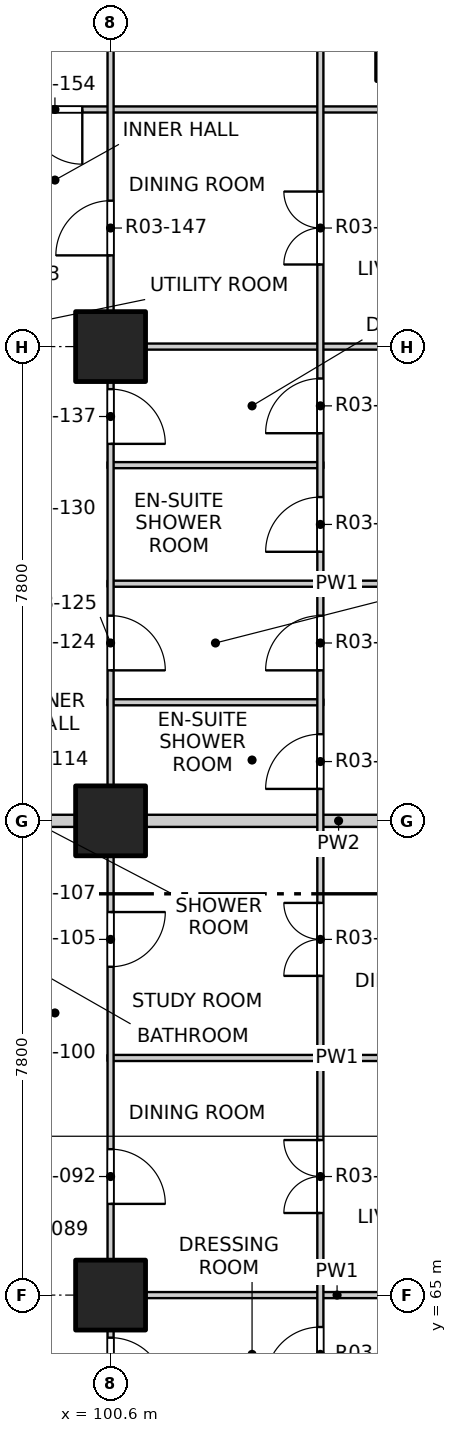
"""IFC4 building model, lengths in metres.
Left out: names, types, materials, properties, quantities, classifications, styles, units other than length and angle.
Written with IfcOpenShell. Run it as: python <this file> out.ifc"""

import sys

from ifc_helpers import new_model, si_unit, direction, frame, frame_2d, origin, origin_2d, place, context, subcontext, project, spatial, rectangle, extrude, element, fill, save


model = new_model("IFC4")
c1 = context("Model", 3, precision=1e-05, world=origin(), true_north=direction((0.0, 1.0)))
c2 = subcontext(c1, "Body", "Model", "MODEL_VIEW")
j1 = project(units=[si_unit("LENGTHUNIT", "METRE"), si_unit("PLANEANGLEUNIT", "RADIAN")], contexts=[c1])
p1 = place(None, origin())
s1 = spatial("IfcSite", under=j1, at=p1, CompositionType="ELEMENT")
p2 = place(p1, origin())
s2 = spatial("IfcBuilding", under=s1, at=p2, CompositionType="ELEMENT")
p3 = place(p2, frame((0.0, 0.0, 39.9)))
s3 = spatial("IfcBuildingStorey", under=s2, at=p3, CompositionType="ELEMENT", Elevation=39.9)
p4 = place(p3, frame((105.5, 85.5, -0.25), z_axis=(0.0, 0.0, 1.0), x_axis=(1.0, 0.0, 0.0)))
e1 = element("IfcColumn", 1, at=p4, inside=s3, PredefinedType="COLUMN", context=c2, shape_type="SweptSolid", body=[
    extrude(rectangle(XDim=1.05, YDim=1.05, at=origin_2d()), origin(), (0.0, 0.0, 1.0), 3.4),
])
for number, where, z_axis, x_axis in (
    (2, (100.6, 65.0, -0.25), (0.0, 0.0, 1.0), (1.0, 0.0, 0.0)),
    (3, (100.6, 72.8, -0.25), (0.0, 0.0, 1.0), (1.0, 0.0, 0.0)),
    (4, (100.6, 80.6, -0.25), (0.0, 0.0, 1.0), (1.0, 0.0, 0.0)),
):
    element("IfcColumn", number, at=place(p3, frame(where, z_axis=z_axis, x_axis=x_axis)), inside=s3, PredefinedType="COLUMN", context=c2, shape_type="SweptSolid", body=[
        extrude(rectangle(XDim=1.15, YDim=1.15, at=origin_2d()), origin(), (0.0, 0.0, 1.0), 3.4),
    ])
p5 = place(p3, frame((100.55, 65.0, 0.0), z_axis=(0.0, 0.0, 1.0), x_axis=(1.0, 0.0, 0.0)))
e5 = element("IfcWall", 5, at=p5, inside=s3, PredefinedType="PARTITIONING", context=c2, shape_type="SweptSolid", body=[
    extrude(rectangle(XDim=7.55, YDim=0.1, at=frame_2d((3.775, 0.0))), origin(), (0.0, 0.0, 1.0), 2.55),
])
p6 = place(p3, frame((100.55, 68.9, 0.0), z_axis=(0.0, 0.0, 1.0), x_axis=(1.0, 0.0, 0.0)))
e6 = element("IfcWall", 6, at=p6, inside=s3, PredefinedType="PARTITIONING", context=c2, shape_type="SweptSolid", body=[
    extrude(rectangle(XDim=7.55, YDim=0.1, at=frame_2d((3.775, 0.0))), origin(), (0.0, 0.0, 1.0), 3.15),
])
p7 = place(p3, frame((96.6, 72.8, 0.0), z_axis=(0.0, 0.0, 1.0), x_axis=(1.0, 0.0, 0.0)))
e7 = element("IfcWall", 7, at=p7, inside=s3, PredefinedType="PARTITIONING", context=c2, shape_type="SweptSolid", body=[
    extrude(rectangle(XDim=4.0, YDim=0.2, at=frame_2d((2.0, 0.0))), origin(), (0.0, 0.0, 1.0), 3.15),
])
p8 = place(p3, frame((100.6, 72.8, 0.0), z_axis=(0.0, 0.0, 1.0), x_axis=(1.0, 0.0, 0.0)))
e8 = element("IfcWall", 8, at=p8, inside=s3, PredefinedType="PARTITIONING", context=c2, shape_type="SweptSolid", body=[
    extrude(rectangle(XDim=7.5, YDim=0.2, at=frame_2d((3.75, 0.0))), origin(), (0.0, 0.0, 1.0), 2.55),
])
p9 = place(p3, frame((100.55, 74.75, 0.0), z_axis=(0.0, 0.0, 1.0), x_axis=(1.0, 0.0, 0.0)))
e9 = element("IfcWall", 9, at=p9, inside=s3, PredefinedType="PARTITIONING", context=c2, shape_type="SweptSolid", body=[
    extrude(rectangle(XDim=3.55, YDim=0.1, at=frame_2d((1.775, 0.0))), origin(), (0.0, 0.0, 1.0), 3.15),
])
p10 = place(p3, frame((100.55, 76.7, 0.0), z_axis=(0.0, 0.0, 1.0), x_axis=(1.0, 0.0, 0.0)))
e10 = element("IfcWall", 10, at=p10, inside=s3, PredefinedType="PARTITIONING", context=c2, shape_type="SweptSolid", body=[
    extrude(rectangle(XDim=7.55, YDim=0.1, at=frame_2d((3.775, 0.0))), origin(), (0.0, 0.0, 1.0), 3.15),
])
p11 = place(p3, frame((100.55, 78.65, 0.0), z_axis=(0.0, 0.0, 1.0), x_axis=(1.0, 0.0, 0.0)))
e11 = element("IfcWall", 11, at=p11, inside=s3, PredefinedType="PARTITIONING", context=c2, shape_type="SweptSolid", body=[
    extrude(rectangle(XDim=3.55, YDim=0.1, at=frame_2d((1.775, 0.0))), origin(), (0.0, 0.0, 1.0), 3.15),
])
p12 = place(p3, frame((100.55, 80.6, 0.0), z_axis=(0.0, 0.0, 1.0), x_axis=(1.0, 0.0, 0.0)))
e12 = element("IfcWall", 12, at=p12, inside=s3, PredefinedType="PARTITIONING", context=c2, shape_type="SweptSolid", body=[
    extrude(rectangle(XDim=7.55, YDim=0.1, at=frame_2d((3.775, 0.0))), origin(), (0.0, 0.0, 1.0), 2.55),
])
p13 = place(p3, frame((96.6, 84.5, 0.0), z_axis=(0.0, 0.0, 1.0), x_axis=(1.0, 0.0, 0.0)))
e13 = element("IfcWall", 13, at=p13, inside=s3, PredefinedType="PARTITIONING", context=c2, shape_type="SweptSolid", body=[
    extrude(rectangle(XDim=11.5, YDim=0.1, at=frame_2d((5.75, 0.0))), origin(), (0.0, 0.0, 1.0), 3.15),
])
p14 = place(p13, frame((2.635, 0.0, 0.0)))
e14 = element("IfcOpeningElement", 14, at=p14, cuts=e13, PredefinedType="OPENING", context=c2, shape_type="SweptSolid", body=[
    extrude(rectangle(XDim=0.9, YDim=2.1, at=frame_2d((0.45, 1.05))), frame((0.0, 0.06, 0.0), z_axis=(0.0, -1.0, 0.0), x_axis=(1.0, 0.0, 0.0)), (0.0, 0.0, 1.0), 0.12),
])
p15 = place(p3, frame((100.6, 49.4, 0.0), z_axis=(0.0, 0.0, 1.0), x_axis=(0.0, 1.0, 0.0)))
e15 = element("IfcWall", 15, at=p15, inside=s3, PredefinedType="PARTITIONING", context=c2, shape_type="SweptSolid", body=[
    extrude(rectangle(XDim=31.2, YDim=0.1, at=frame_2d((15.6, 0.0))), origin(), (0.0, 0.0, 1.0), 3.15),
])
p16 = place(p15, frame((1.5, 0.0, 0.0)))
e16 = element("IfcOpeningElement", 16, at=p16, cuts=e15, PredefinedType="OPENING", context=c2, shape_type="SweptSolid", body=[
    extrude(rectangle(XDim=0.9, YDim=2.1, at=frame_2d((0.45, 1.05))), frame((0.0, 0.06, 0.0), z_axis=(0.0, -1.0, 0.0), x_axis=(1.0, 0.0, 0.0)), (0.0, 0.0, 1.0), 0.12),
])
p17 = place(p15, frame((6.225, 0.0, 0.0)))
e17 = element("IfcOpeningElement", 17, at=p17, cuts=e15, PredefinedType="OPENING", context=c2, shape_type="SweptSolid", body=[
    extrude(rectangle(XDim=0.9, YDim=2.1, at=frame_2d((0.45, 1.05))), frame((0.0, 0.06, 0.0), z_axis=(0.0, -1.0, 0.0), x_axis=(1.0, 0.0, 0.0)), (0.0, 0.0, 1.0), 0.12),
])
p18 = place(p15, frame((10.275, 0.0, 0.0)))
e18 = element("IfcOpeningElement", 18, at=p18, cuts=e15, PredefinedType="OPENING", context=c2, shape_type="SweptSolid", body=[
    extrude(rectangle(XDim=0.9, YDim=2.1, at=frame_2d((0.45, 1.05))), frame((0.0, 0.06, 0.0), z_axis=(0.0, -1.0, 0.0), x_axis=(1.0, 0.0, 0.0)), (0.0, 0.0, 1.0), 0.12),
])
p19 = place(p15, frame((14.0, 0.0, 0.0)))
e19 = element("IfcOpeningElement", 19, at=p19, cuts=e15, PredefinedType="OPENING", context=c2, shape_type="SweptSolid", body=[
    extrude(rectangle(XDim=0.9, YDim=2.1, at=frame_2d((0.45, 1.05))), frame((0.0, 0.06, 0.0), z_axis=(0.0, -1.0, 0.0), x_axis=(1.0, 0.0, 0.0)), (0.0, 0.0, 1.0), 0.12),
])
p20 = place(p15, frame((17.1, 0.0, 0.0)))
e20 = element("IfcOpeningElement", 20, at=p20, cuts=e15, PredefinedType="OPENING", context=c2, shape_type="SweptSolid", body=[
    extrude(rectangle(XDim=0.9, YDim=2.1, at=frame_2d((0.45, 1.05))), frame((0.0, 0.06, 0.0), z_axis=(0.0, -1.0, 0.0), x_axis=(1.0, 0.0, 0.0)), (0.0, 0.0, 1.0), 0.12),
])
p21 = place(p15, frame((21.0, 0.0, 0.0)))
e21 = element("IfcOpeningElement", 21, at=p21, cuts=e15, PredefinedType="OPENING", context=c2, shape_type="SweptSolid", body=[
    extrude(rectangle(XDim=0.9, YDim=2.1, at=frame_2d((0.45, 1.05))), frame((0.0, 0.06, 0.0), z_axis=(0.0, -1.0, 0.0), x_axis=(1.0, 0.0, 0.0)), (0.0, 0.0, 1.0), 0.12),
])
p22 = place(p15, frame((25.875, 0.0, 0.0)))
e22 = element("IfcOpeningElement", 22, at=p22, cuts=e15, PredefinedType="OPENING", context=c2, shape_type="SweptSolid", body=[
    extrude(rectangle(XDim=0.9, YDim=2.1, at=frame_2d((0.45, 1.05))), frame((0.0, 0.06, 0.0), z_axis=(0.0, -1.0, 0.0), x_axis=(1.0, 0.0, 0.0)), (0.0, 0.0, 1.0), 0.12),
])
p23 = place(p15, frame((29.6, 0.0, 0.0)))
e23 = element("IfcOpeningElement", 23, at=p23, cuts=e15, PredefinedType="OPENING", context=c2, shape_type="SweptSolid", body=[
    extrude(rectangle(XDim=0.9, YDim=2.1, at=frame_2d((0.45, 1.05))), frame((0.0, 0.06, 0.0), z_axis=(0.0, -1.0, 0.0), x_axis=(1.0, 0.0, 0.0)), (0.0, 0.0, 1.0), 0.12),
])
p24 = place(p3, frame((100.6, 80.6, 0.0), z_axis=(0.0, 0.0, 1.0), x_axis=(0.0, 1.0, 0.0)))
e24 = element("IfcWall", 24, at=p24, inside=s3, PredefinedType="PARTITIONING", context=c2, shape_type="SweptSolid", body=[
    extrude(rectangle(XDim=7.5, YDim=0.1, at=frame_2d((3.75, 0.0))), origin(), (0.0, 0.0, 1.0), 2.55),
])
p25 = place(p24, frame((1.5, 0.0, 0.0)))
e25 = element("IfcOpeningElement", 25, at=p25, cuts=e24, PredefinedType="OPENING", context=c2, shape_type="SweptSolid", body=[
    extrude(rectangle(XDim=0.9, YDim=2.1, at=frame_2d((0.45, 1.05))), frame((0.0, 0.06, 0.0), z_axis=(0.0, -1.0, 0.0), x_axis=(1.0, 0.0, 0.0)), (0.0, 0.0, 1.0), 0.12),
])
p26 = place(p24, frame((5.4, 0.0, 0.0)))
e26 = element("IfcOpeningElement", 26, at=p26, cuts=e24, PredefinedType="OPENING", context=c2, shape_type="SweptSolid", body=[
    extrude(rectangle(XDim=0.9, YDim=2.1, at=frame_2d((0.45, 1.05))), frame((0.0, 0.06, 0.0), z_axis=(0.0, -1.0, 0.0), x_axis=(1.0, 0.0, 0.0)), (0.0, 0.0, 1.0), 0.12),
])
p27 = place(p3, frame((104.05, 41.9, 0.0), z_axis=(0.0, 0.0, 1.0), x_axis=(0.0, 1.0, 0.0)))
e27 = element("IfcWall", 27, at=p27, inside=s3, PredefinedType="PARTITIONING", context=c2, shape_type="SweptSolid", body=[
    extrude(rectangle(XDim=46.2, YDim=0.1, at=frame_2d((23.1, 0.0))), origin(), (0.0, 0.0, 1.0), 3.15),
])
p28 = place(p27, frame((1.05, 0.0, 0.0)))
e28 = element("IfcOpeningElement", 28, at=p28, cuts=e27, PredefinedType="OPENING", context=c2, shape_type="SweptSolid", body=[
    extrude(rectangle(XDim=1.2, YDim=2.1, at=frame_2d((0.6, 1.05))), frame((0.0, 0.06, 0.0), z_axis=(0.0, -1.0, 0.0), x_axis=(1.0, 0.0, 0.0)), (0.0, 0.0, 1.0), 0.12),
])
p29 = place(p27, frame((4.125, 0.0, 0.0)))
e29 = element("IfcOpeningElement", 29, at=p29, cuts=e27, PredefinedType="OPENING", context=c2, shape_type="SweptSolid", body=[
    extrude(rectangle(XDim=0.9, YDim=2.1, at=frame_2d((0.45, 1.05))), frame((0.0, 0.06, 0.0), z_axis=(0.0, -1.0, 0.0), x_axis=(1.0, 0.0, 0.0)), (0.0, 0.0, 1.0), 0.12),
])
p30 = place(p27, frame((6.075, 0.0, 0.0)))
e30 = element("IfcOpeningElement", 30, at=p30, cuts=e27, PredefinedType="OPENING", context=c2, shape_type="SweptSolid", body=[
    extrude(rectangle(XDim=0.9, YDim=2.1, at=frame_2d((0.45, 1.05))), frame((0.0, 0.06, 0.0), z_axis=(0.0, -1.0, 0.0), x_axis=(1.0, 0.0, 0.0)), (0.0, 0.0, 1.0), 0.12),
])
p31 = place(p27, frame((8.85, 0.0, 0.0)))
e31 = element("IfcOpeningElement", 31, at=p31, cuts=e27, PredefinedType="OPENING", context=c2, shape_type="SweptSolid", body=[
    extrude(rectangle(XDim=1.2, YDim=2.1, at=frame_2d((0.6, 1.05))), frame((0.0, 0.06, 0.0), z_axis=(0.0, -1.0, 0.0), x_axis=(1.0, 0.0, 0.0)), (0.0, 0.0, 1.0), 0.12),
])
p32 = place(p27, frame((11.925, 0.0, 0.0)))
e32 = element("IfcOpeningElement", 32, at=p32, cuts=e27, PredefinedType="OPENING", context=c2, shape_type="SweptSolid", body=[
    extrude(rectangle(XDim=0.9, YDim=2.1, at=frame_2d((0.45, 1.05))), frame((0.0, 0.06, 0.0), z_axis=(0.0, -1.0, 0.0), x_axis=(1.0, 0.0, 0.0)), (0.0, 0.0, 1.0), 0.12),
])
p33 = place(p27, frame((13.875, 0.0, 0.0)))
e33 = element("IfcOpeningElement", 33, at=p33, cuts=e27, PredefinedType="OPENING", context=c2, shape_type="SweptSolid", body=[
    extrude(rectangle(XDim=0.9, YDim=2.1, at=frame_2d((0.45, 1.05))), frame((0.0, 0.06, 0.0), z_axis=(0.0, -1.0, 0.0), x_axis=(1.0, 0.0, 0.0)), (0.0, 0.0, 1.0), 0.12),
])
p34 = place(p27, frame((15.825, 0.0, 0.0)))
e34 = element("IfcOpeningElement", 34, at=p34, cuts=e27, PredefinedType="OPENING", context=c2, shape_type="SweptSolid", body=[
    extrude(rectangle(XDim=0.9, YDim=2.1, at=frame_2d((0.45, 1.05))), frame((0.0, 0.06, 0.0), z_axis=(0.0, -1.0, 0.0), x_axis=(1.0, 0.0, 0.0)), (0.0, 0.0, 1.0), 0.12),
])
p35 = place(p27, frame((17.775, 0.0, 0.0)))
e35 = element("IfcOpeningElement", 35, at=p35, cuts=e27, PredefinedType="OPENING", context=c2, shape_type="SweptSolid", body=[
    extrude(rectangle(XDim=0.9, YDim=2.1, at=frame_2d((0.45, 1.05))), frame((0.0, 0.06, 0.0), z_axis=(0.0, -1.0, 0.0), x_axis=(1.0, 0.0, 0.0)), (0.0, 0.0, 1.0), 0.12),
])
p36 = place(p27, frame((19.725, 0.0, 0.0)))
e36 = element("IfcOpeningElement", 36, at=p36, cuts=e27, PredefinedType="OPENING", context=c2, shape_type="SweptSolid", body=[
    extrude(rectangle(XDim=0.9, YDim=2.1, at=frame_2d((0.45, 1.05))), frame((0.0, 0.06, 0.0), z_axis=(0.0, -1.0, 0.0), x_axis=(1.0, 0.0, 0.0)), (0.0, 0.0, 1.0), 0.12),
])
p37 = place(p27, frame((21.675, 0.0, 0.0)))
e37 = element("IfcOpeningElement", 37, at=p37, cuts=e27, PredefinedType="OPENING", context=c2, shape_type="SweptSolid", body=[
    extrude(rectangle(XDim=0.9, YDim=2.1, at=frame_2d((0.45, 1.05))), frame((0.0, 0.06, 0.0), z_axis=(0.0, -1.0, 0.0), x_axis=(1.0, 0.0, 0.0)), (0.0, 0.0, 1.0), 0.12),
])
p38 = place(p27, frame((24.45, 0.0, 0.0)))
e38 = element("IfcOpeningElement", 38, at=p38, cuts=e27, PredefinedType="OPENING", context=c2, shape_type="SweptSolid", body=[
    extrude(rectangle(XDim=1.2, YDim=2.1, at=frame_2d((0.6, 1.05))), frame((0.0, 0.06, 0.0), z_axis=(0.0, -1.0, 0.0), x_axis=(1.0, 0.0, 0.0)), (0.0, 0.0, 1.0), 0.12),
])
p39 = place(p27, frame((28.35, 0.0, 0.0)))
e39 = element("IfcOpeningElement", 39, at=p39, cuts=e27, PredefinedType="OPENING", context=c2, shape_type="SweptSolid", body=[
    extrude(rectangle(XDim=1.2, YDim=2.1, at=frame_2d((0.6, 1.05))), frame((0.0, 0.06, 0.0), z_axis=(0.0, -1.0, 0.0), x_axis=(1.0, 0.0, 0.0)), (0.0, 0.0, 1.0), 0.12),
])
p40 = place(p27, frame((31.425, 0.0, 0.0)))
e40 = element("IfcOpeningElement", 40, at=p40, cuts=e27, PredefinedType="OPENING", context=c2, shape_type="SweptSolid", body=[
    extrude(rectangle(XDim=0.9, YDim=2.1, at=frame_2d((0.45, 1.05))), frame((0.0, 0.06, 0.0), z_axis=(0.0, -1.0, 0.0), x_axis=(1.0, 0.0, 0.0)), (0.0, 0.0, 1.0), 0.12),
])
p41 = place(p27, frame((33.375, 0.0, 0.0)))
e41 = element("IfcOpeningElement", 41, at=p41, cuts=e27, PredefinedType="OPENING", context=c2, shape_type="SweptSolid", body=[
    extrude(rectangle(XDim=0.9, YDim=2.1, at=frame_2d((0.45, 1.05))), frame((0.0, 0.06, 0.0), z_axis=(0.0, -1.0, 0.0), x_axis=(1.0, 0.0, 0.0)), (0.0, 0.0, 1.0), 0.12),
])
p42 = place(p27, frame((35.325, 0.0, 0.0)))
e42 = element("IfcOpeningElement", 42, at=p42, cuts=e27, PredefinedType="OPENING", context=c2, shape_type="SweptSolid", body=[
    extrude(rectangle(XDim=0.9, YDim=2.1, at=frame_2d((0.45, 1.05))), frame((0.0, 0.06, 0.0), z_axis=(0.0, -1.0, 0.0), x_axis=(1.0, 0.0, 0.0)), (0.0, 0.0, 1.0), 0.12),
])
p43 = place(p27, frame((37.275, 0.0, 0.0)))
e43 = element("IfcOpeningElement", 43, at=p43, cuts=e27, PredefinedType="OPENING", context=c2, shape_type="SweptSolid", body=[
    extrude(rectangle(XDim=0.9, YDim=2.1, at=frame_2d((0.45, 1.05))), frame((0.0, 0.06, 0.0), z_axis=(0.0, -1.0, 0.0), x_axis=(1.0, 0.0, 0.0)), (0.0, 0.0, 1.0), 0.12),
])
p44 = place(p27, frame((40.05, 0.0, 0.0)))
e44 = element("IfcOpeningElement", 44, at=p44, cuts=e27, PredefinedType="OPENING", context=c2, shape_type="SweptSolid", body=[
    extrude(rectangle(XDim=1.2, YDim=2.1, at=frame_2d((0.6, 1.05))), frame((0.0, 0.06, 0.0), z_axis=(0.0, -1.0, 0.0), x_axis=(1.0, 0.0, 0.0)), (0.0, 0.0, 1.0), 0.12),
])
p45 = place(p27, frame((43.95, 0.0, 0.0)))
e45 = element("IfcOpeningElement", 45, at=p45, cuts=e27, PredefinedType="OPENING", context=c2, shape_type="SweptSolid", body=[
    extrude(rectangle(XDim=1.2, YDim=2.1, at=frame_2d((0.6, 1.05))), frame((0.0, 0.06, 0.0), z_axis=(0.0, -1.0, 0.0), x_axis=(1.0, 0.0, 0.0)), (0.0, 0.0, 1.0), 0.12),
])
p46 = place(p19, origin())
e46 = element("IfcDoor", 46, at=p46, inside=s3, OperationType="SINGLE_SWING_RIGHT", PredefinedType="DOOR", context=c2, shape_type="SweptSolid", body=[
    extrude(rectangle(XDim=0.9, YDim=2.1, at=frame_2d((0.45, 1.05))), frame((0.0, 0.025, 0.0), z_axis=(0.0, -1.0, 0.0), x_axis=(1.0, 0.0, 0.0)), (0.0, 0.0, 1.0), 0.05),
])
fill(e19, e46)
p47 = place(p37, origin())
e47 = element("IfcDoor", 47, at=p47, inside=s3, OperationType="SINGLE_SWING_LEFT", PredefinedType="DOOR", context=c2, shape_type="SweptSolid", body=[
    extrude(rectangle(XDim=0.9, YDim=2.1, at=frame_2d((0.45, 1.05))), frame((0.0, 0.025, 0.0), z_axis=(0.0, -1.0, 0.0), x_axis=(1.0, 0.0, 0.0)), (0.0, 0.0, 1.0), 0.05),
])
fill(e37, e47)
p48 = place(p20, origin())
e48 = element("IfcDoor", 48, at=p48, inside=s3, OperationType="SINGLE_SWING_RIGHT", PredefinedType="DOOR", context=c2, shape_type="SweptSolid", body=[
    extrude(rectangle(XDim=0.9, YDim=2.1, at=frame_2d((0.45, 1.05))), frame((0.0, 0.025, 0.0), z_axis=(0.0, -1.0, 0.0), x_axis=(1.0, 0.0, 0.0)), (0.0, 0.0, 1.0), 0.05),
])
fill(e20, e48)
p49 = place(p38, origin())
e49 = element("IfcDoor", 49, at=p49, inside=s3, OperationType="DOUBLE_DOOR_SINGLE_SWING", PredefinedType="DOOR", context=c2, shape_type="SweptSolid", body=[
    extrude(rectangle(XDim=1.2, YDim=2.1, at=frame_2d((0.6, 1.05))), frame((0.0, 0.025, 0.0), z_axis=(0.0, -1.0, 0.0), x_axis=(1.0, 0.0, 0.0)), (0.0, 0.0, 1.0), 0.05),
])
fill(e38, e49)
p50 = place(p21, origin())
e50 = element("IfcDoor", 50, at=p50, inside=s3, OperationType="SINGLE_SWING_LEFT", PredefinedType="DOOR", context=c2, shape_type="SweptSolid", body=[
    extrude(rectangle(XDim=0.9, YDim=2.1, at=frame_2d((0.45, 1.05))), frame((0.0, 0.025, 0.0), z_axis=(0.0, -1.0, 0.0), x_axis=(1.0, 0.0, 0.0)), (0.0, 0.0, 1.0), 0.05),
])
fill(e21, e50)
p51 = place(p39, origin())
e51 = element("IfcDoor", 51, at=p51, inside=s3, OperationType="DOUBLE_DOOR_SINGLE_SWING", PredefinedType="DOOR", context=c2, shape_type="SweptSolid", body=[
    extrude(rectangle(XDim=1.2, YDim=2.1, at=frame_2d((0.6, 1.05))), frame((0.0, 0.025, 0.0), z_axis=(0.0, -1.0, 0.0), x_axis=(1.0, 0.0, 0.0)), (0.0, 0.0, 1.0), 0.05),
])
fill(e39, e51)
p52 = place(p40, origin())
e52 = element("IfcDoor", 52, at=p52, inside=s3, OperationType="SINGLE_SWING_LEFT", PredefinedType="DOOR", context=c2, shape_type="SweptSolid", body=[
    extrude(rectangle(XDim=0.9, YDim=2.1, at=frame_2d((0.45, 1.05))), frame((0.0, 0.025, 0.0), z_axis=(0.0, -1.0, 0.0), x_axis=(1.0, 0.0, 0.0)), (0.0, 0.0, 1.0), 0.05),
])
fill(e40, e52)
p53 = place(p22, origin())
e53 = element("IfcDoor", 53, at=p53, inside=s3, OperationType="SINGLE_SWING_RIGHT", PredefinedType="DOOR", context=c2, shape_type="SweptSolid", body=[
    extrude(rectangle(XDim=0.9, YDim=2.1, at=frame_2d((0.45, 1.05))), frame((0.0, 0.025, 0.0), z_axis=(0.0, -1.0, 0.0), x_axis=(1.0, 0.0, 0.0)), (0.0, 0.0, 1.0), 0.05),
])
fill(e22, e53)
p54 = place(p41, origin())
e54 = element("IfcDoor", 54, at=p54, inside=s3, OperationType="SINGLE_SWING_LEFT", PredefinedType="DOOR", context=c2, shape_type="SweptSolid", body=[
    extrude(rectangle(XDim=0.9, YDim=2.1, at=frame_2d((0.45, 1.05))), frame((0.0, 0.025, 0.0), z_axis=(0.0, -1.0, 0.0), x_axis=(1.0, 0.0, 0.0)), (0.0, 0.0, 1.0), 0.05),
])
fill(e41, e54)
p55 = place(p42, origin())
e55 = element("IfcDoor", 55, at=p55, inside=s3, OperationType="SINGLE_SWING_LEFT", PredefinedType="DOOR", context=c2, shape_type="SweptSolid", body=[
    extrude(rectangle(XDim=0.9, YDim=2.1, at=frame_2d((0.45, 1.05))), frame((0.0, 0.025, 0.0), z_axis=(0.0, -1.0, 0.0), x_axis=(1.0, 0.0, 0.0)), (0.0, 0.0, 1.0), 0.05),
])
fill(e42, e55)
p56 = place(p23, origin())
e56 = element("IfcDoor", 56, at=p56, inside=s3, OperationType="SINGLE_SWING_RIGHT", PredefinedType="DOOR", context=c2, shape_type="SweptSolid", body=[
    extrude(rectangle(XDim=0.9, YDim=2.1, at=frame_2d((0.45, 1.05))), frame((0.0, 0.025, 0.0), z_axis=(0.0, -1.0, 0.0), x_axis=(1.0, 0.0, 0.0)), (0.0, 0.0, 1.0), 0.05),
])
fill(e23, e56)
p57 = place(p43, origin())
e57 = element("IfcDoor", 57, at=p57, inside=s3, OperationType="SINGLE_SWING_LEFT", PredefinedType="DOOR", context=c2, shape_type="SweptSolid", body=[
    extrude(rectangle(XDim=0.9, YDim=2.1, at=frame_2d((0.45, 1.05))), frame((0.0, 0.025, 0.0), z_axis=(0.0, -1.0, 0.0), x_axis=(1.0, 0.0, 0.0)), (0.0, 0.0, 1.0), 0.05),
])
fill(e43, e57)
p58 = place(p25, origin())
e58 = element("IfcDoor", 58, at=p58, inside=s3, OperationType="SINGLE_SWING_LEFT", PredefinedType="DOOR", context=c2, shape_type="SweptSolid", body=[
    extrude(rectangle(XDim=0.9, YDim=2.1, at=frame_2d((0.45, 1.05))), frame((0.0, 0.025, 0.0), z_axis=(0.0, -1.0, 0.0), x_axis=(1.0, 0.0, 0.0)), (0.0, 0.0, 1.0), 0.05),
])
fill(e25, e58)
p59 = place(p44, origin())
e59 = element("IfcDoor", 59, at=p59, inside=s3, OperationType="DOUBLE_DOOR_SINGLE_SWING", PredefinedType="DOOR", context=c2, shape_type="SweptSolid", body=[
    extrude(rectangle(XDim=1.2, YDim=2.1, at=frame_2d((0.6, 1.05))), frame((0.0, 0.025, 0.0), z_axis=(0.0, -1.0, 0.0), x_axis=(1.0, 0.0, 0.0)), (0.0, 0.0, 1.0), 0.05),
])
fill(e44, e59)
p60 = place(p14, origin())
e60 = element("IfcDoor", 60, at=p60, inside=s3, OperationType="SINGLE_SWING_LEFT", PredefinedType="DOOR", context=c2, shape_type="SweptSolid", body=[
    extrude(rectangle(XDim=0.9, YDim=2.1, at=frame_2d((0.45, 1.05))), frame((0.0, 0.025, 0.0), z_axis=(0.0, -1.0, 0.0), x_axis=(1.0, 0.0, 0.0)), (0.0, 0.0, 1.0), 0.05),
])
fill(e14, e60)
save(model, sys.argv[1])
